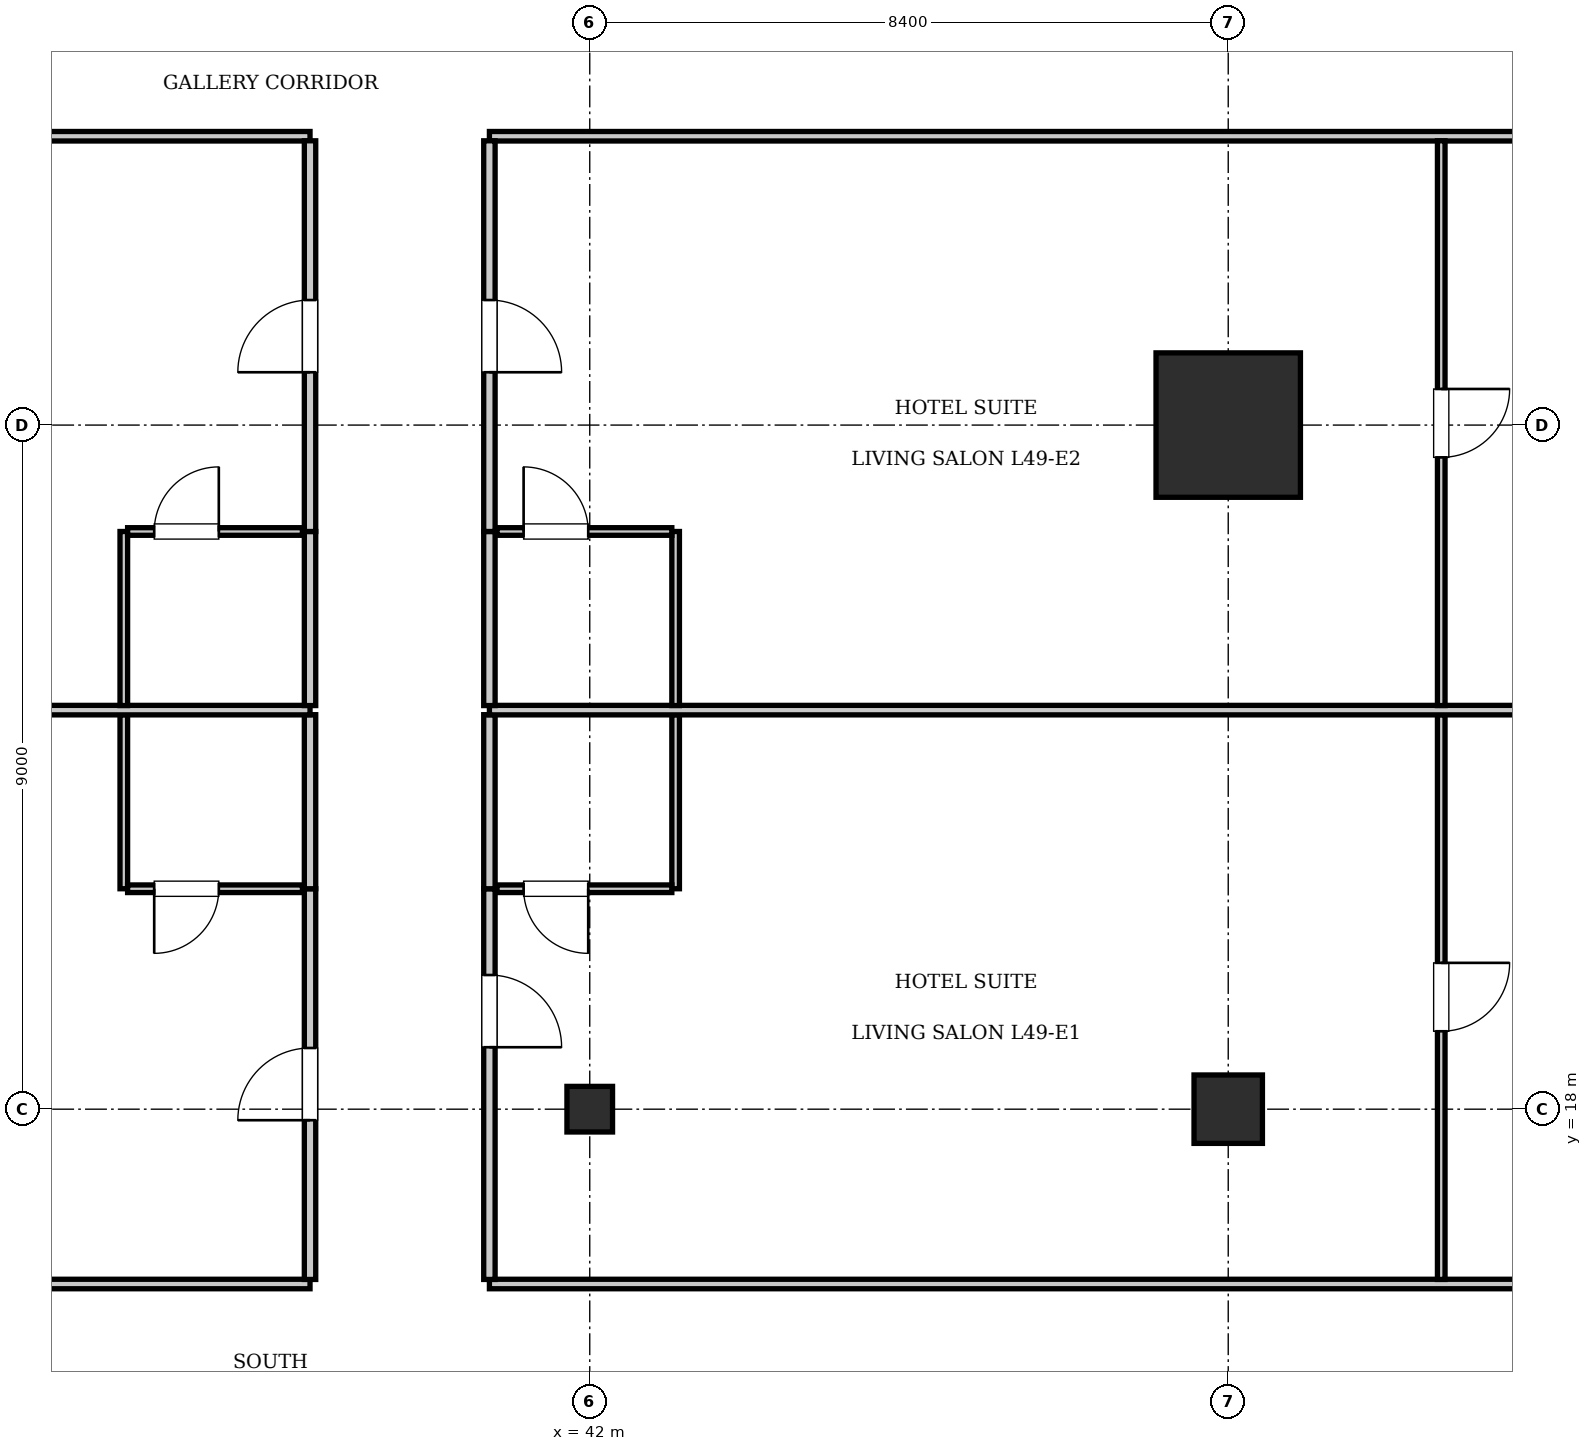
"""IFC4 building model, lengths in metres.
Left out: names, types, materials, properties, quantities, classifications, styles, units other than length and angle.
Written with IfcOpenShell. Run it as: python <this file> out.ifc"""

import sys

from ifc_helpers import new_model, si_unit, direction, frame, frame_2d, origin, origin_2d, place, context, subcontext, project, spatial, rectangle, i_section, extrude, element, fill, save


model = new_model("IFC4")
c1 = context("Model", 3, precision=1e-05, world=origin(), true_north=direction((0.0, 1.0)))
c2 = subcontext(c1, "Body", "Model", "MODEL_VIEW")
j1 = project(units=[si_unit("LENGTHUNIT", "METRE"), si_unit("PLANEANGLEUNIT", "RADIAN")], contexts=[c1])
p1 = place(None, origin())
s1 = spatial("IfcSite", under=j1, at=p1, CompositionType="ELEMENT")
p2 = place(p1, origin())
s2 = spatial("IfcBuilding", under=s1, at=p2, CompositionType="ELEMENT")
p3 = place(p2, frame((0.0, 0.0, 200.55)))
s3 = spatial("IfcBuildingStorey", under=s2, at=p3, CompositionType="ELEMENT", Elevation=200.55)
p4 = place(p3, frame((50.4, 27.0, 0.0), z_axis=(0.0, 0.0, 1.0), x_axis=(1.0, 0.0, 0.0)))
e1 = element("IfcColumn", 1, at=p4, inside=s3, PredefinedType="COLUMN", context=c2, shape_type="SweptSolid", body=[
    extrude(rectangle(XDim=1.9, YDim=1.9, at=origin_2d()), origin(), (0.0, 0.0, 1.0), 3.85),
])
p5 = place(p3, frame((50.4, 18.0, 0.0), z_axis=(0.0, 0.0, 1.0), x_axis=(1.0, 0.0, 0.0)))
e2 = element("IfcColumn", 2, at=p5, inside=s3, PredefinedType="COLUMN", context=c2, shape_type="SweptSolid", body=[
    extrude(rectangle(XDim=0.9, YDim=0.9, at=origin_2d()), origin(), (0.0, 0.0, 1.0), 3.85),
])
p6 = place(p3, frame((42.0, 18.0, 0.0), z_axis=(0.0, 0.0, 1.0), x_axis=(1.0, 0.0, 0.0)))
e3 = element("IfcColumn", 3, at=p6, inside=s3, PredefinedType="COLUMN", context=c2, shape_type="SweptSolid", body=[
    extrude(i_section(OverallWidth=0.6, OverallDepth=0.6, WebThickness=0.025, FlangeThickness=0.038, at=origin_2d()), origin(), (0.0, 0.0, 1.0), 3.85),
])
p7 = place(p3, frame((13.2, 15.7, 0.0), z_axis=(0.0, 0.0, 1.0), x_axis=(1.0, 0.0, 0.0)))
e4 = element("IfcWall", 4, at=p7, inside=s3, PredefinedType="PARTITIONING", context=c2, shape_type="SweptSolid", body=[
    extrude(rectangle(XDim=25.12, YDim=0.125, at=frame_2d((12.56, 0.0))), origin(), (0.0, 0.0, 1.0), 3.61),
])
p8 = place(p3, frame((40.68, 15.7, 0.0), z_axis=(0.0, 0.0, 1.0), x_axis=(1.0, 0.0, 0.0)))
e5 = element("IfcWall", 5, at=p8, inside=s3, PredefinedType="PARTITIONING", context=c2, shape_type="SweptSolid", body=[
    extrude(rectangle(XDim=21.72, YDim=0.125, at=frame_2d((10.86, 0.0))), origin(), (0.0, 0.0, 1.0), 3.61),
])
p9 = place(p3, frame((13.2, 30.8, 0.0), z_axis=(0.0, 0.0, 1.0), x_axis=(1.0, 0.0, 0.0)))
e6 = element("IfcWall", 6, at=p9, inside=s3, PredefinedType="PARTITIONING", context=c2, shape_type="SweptSolid", body=[
    extrude(rectangle(XDim=25.12, YDim=0.125, at=frame_2d((12.56, 0.0))), origin(), (0.0, 0.0, 1.0), 3.61),
])
p10 = place(p3, frame((40.68, 30.8, 0.0), z_axis=(0.0, 0.0, 1.0), x_axis=(1.0, 0.0, 0.0)))
e7 = element("IfcWall", 7, at=p10, inside=s3, PredefinedType="PARTITIONING", context=c2, shape_type="SweptSolid", body=[
    extrude(rectangle(XDim=21.72, YDim=0.125, at=frame_2d((10.86, 0.0))), origin(), (0.0, 0.0, 1.0), 3.61),
])
p11 = place(p3, frame((38.32, 15.76, 0.0), z_axis=(0.0, 0.0, 1.0), x_axis=(0.0, 1.0, 0.0)))
e8 = element("IfcWall", 8, at=p11, inside=s3, PredefinedType="PARTITIONING", context=c2, shape_type="SweptSolid", body=[
    extrude(rectangle(XDim=5.14, YDim=0.15, at=frame_2d((2.57, 0.0))), origin(), (0.0, 0.0, 1.0), 3.61),
])
p12 = place(p11, frame((2.095, 0.0, 0.0)))
e9 = element("IfcOpeningElement", 9, at=p12, cuts=e8, PredefinedType="OPENING", context=c2, shape_type="SweptSolid", body=[
    extrude(rectangle(XDim=0.95, YDim=2.15, at=frame_2d((0.475, 1.075))), frame((0.0, 0.085, 0.0), z_axis=(0.0, -1.0, 0.0), x_axis=(1.0, 0.0, 0.0)), (0.0, 0.0, 1.0), 0.17),
])
p13 = place(p3, frame((38.32, 20.9, 0.0), z_axis=(0.0, 0.0, 1.0), x_axis=(0.0, 1.0, 0.0)))
e10 = element("IfcWall", 10, at=p13, inside=s3, PredefinedType="PARTITIONING", context=c2, shape_type="SweptSolid", body=[
    extrude(rectangle(XDim=2.29, YDim=0.15, at=frame_2d((1.145, 0.0))), origin(), (0.0, 0.0, 1.0), 3.61),
])
p14 = place(p3, frame((35.87, 20.9, 0.0), z_axis=(0.0, 0.0, 1.0), x_axis=(0.0, 1.0, 0.0)))
e11 = element("IfcWall", 11, at=p14, inside=s3, PredefinedType="PARTITIONING", context=c2, shape_type="SweptSolid", body=[
    extrude(rectangle(XDim=2.29, YDim=0.1, at=frame_2d((1.145, 0.0))), origin(), (0.0, 0.0, 1.0), 3.61),
])
p15 = place(p3, frame((35.92, 20.9, 0.0), z_axis=(0.0, 0.0, 1.0), x_axis=(1.0, 0.0, 0.0)))
e12 = element("IfcWall", 12, at=p15, inside=s3, PredefinedType="PARTITIONING", context=c2, shape_type="SweptSolid", body=[
    extrude(rectangle(XDim=2.3, YDim=0.1, at=frame_2d((1.15, 0.0))), origin(), (0.0, 0.0, 1.0), 3.61),
])
p16 = place(p15, frame((0.35, 0.0, 0.0)))
e13 = element("IfcOpeningElement", 13, at=p16, cuts=e12, PredefinedType="OPENING", context=c2, shape_type="SweptSolid", body=[
    extrude(rectangle(XDim=0.85, YDim=2.1, at=frame_2d((0.425, 1.05))), frame((0.0, 0.06, 0.0), z_axis=(0.0, -1.0, 0.0), x_axis=(1.0, 0.0, 0.0)), (0.0, 0.0, 1.0), 0.12),
])
p17 = place(p3, frame((40.68, 15.76, 0.0), z_axis=(0.0, 0.0, 1.0), x_axis=(0.0, 1.0, 0.0)))
e14 = element("IfcWall", 14, at=p17, inside=s3, PredefinedType="PARTITIONING", context=c2, shape_type="SweptSolid", body=[
    extrude(rectangle(XDim=5.14, YDim=0.15, at=frame_2d((2.57, 0.0))), origin(), (0.0, 0.0, 1.0), 3.61),
])
p18 = place(p17, frame((3.055, 0.0, 0.0)))
e15 = element("IfcOpeningElement", 15, at=p18, cuts=e14, PredefinedType="OPENING", context=c2, shape_type="SweptSolid", body=[
    extrude(rectangle(XDim=0.95, YDim=2.15, at=frame_2d((0.475, 1.075))), frame((0.0, 0.085, 0.0), z_axis=(0.0, -1.0, 0.0), x_axis=(1.0, 0.0, 0.0)), (0.0, 0.0, 1.0), 0.17),
])
p19 = place(p3, frame((40.68, 20.9, 0.0), z_axis=(0.0, 0.0, 1.0), x_axis=(0.0, 1.0, 0.0)))
e16 = element("IfcWall", 16, at=p19, inside=s3, PredefinedType="PARTITIONING", context=c2, shape_type="SweptSolid", body=[
    extrude(rectangle(XDim=2.29, YDim=0.15, at=frame_2d((1.145, 0.0))), origin(), (0.0, 0.0, 1.0), 3.61),
])
p20 = place(p3, frame((43.13, 20.9, 0.0), z_axis=(0.0, 0.0, 1.0), x_axis=(0.0, 1.0, 0.0)))
e17 = element("IfcWall", 17, at=p20, inside=s3, PredefinedType="PARTITIONING", context=c2, shape_type="SweptSolid", body=[
    extrude(rectangle(XDim=2.29, YDim=0.1, at=frame_2d((1.145, 0.0))), origin(), (0.0, 0.0, 1.0), 3.61),
])
p21 = place(p3, frame((40.78, 20.9, 0.0), z_axis=(0.0, 0.0, 1.0), x_axis=(1.0, 0.0, 0.0)))
e18 = element("IfcWall", 18, at=p21, inside=s3, PredefinedType="PARTITIONING", context=c2, shape_type="SweptSolid", body=[
    extrude(rectangle(XDim=2.3, YDim=0.1, at=frame_2d((1.15, 0.0))), origin(), (0.0, 0.0, 1.0), 3.61),
])
p22 = place(p21, frame((0.35, 0.0, 0.0)))
e19 = element("IfcOpeningElement", 19, at=p22, cuts=e18, PredefinedType="OPENING", context=c2, shape_type="SweptSolid", body=[
    extrude(rectangle(XDim=0.85, YDim=2.1, at=frame_2d((0.425, 1.05))), frame((0.0, 0.06, 0.0), z_axis=(0.0, -1.0, 0.0), x_axis=(1.0, 0.0, 0.0)), (0.0, 0.0, 1.0), 0.12),
])
p23 = place(p3, frame((53.202, 15.76, 0.0), z_axis=(0.0, 0.0, 1.0), x_axis=(0.0, 1.0, 0.0)))
e20 = element("IfcWall", 20, at=p23, inside=s3, PredefinedType="PARTITIONING", context=c2, shape_type="SweptSolid", body=[
    extrude(rectangle(XDim=7.43, YDim=0.1, at=frame_2d((3.715, 0.0))), origin(), (0.0, 0.0, 1.0), 3.61),
])
p24 = place(p23, frame((3.265, 0.0, 0.0)))
e21 = element("IfcOpeningElement", 21, at=p24, cuts=e20, PredefinedType="OPENING", context=c2, shape_type="SweptSolid", body=[
    extrude(rectangle(XDim=0.9, YDim=2.1, at=frame_2d((0.45, 1.05))), frame((0.0, 0.06, 0.0), z_axis=(0.0, -1.0, 0.0), x_axis=(1.0, 0.0, 0.0)), (0.0, 0.0, 1.0), 0.12),
])
p25 = place(p3, frame((13.2, 23.25, 0.0), z_axis=(0.0, 0.0, 1.0), x_axis=(1.0, 0.0, 0.0)))
e22 = element("IfcWall", 22, at=p25, inside=s3, PredefinedType="PARTITIONING", context=c2, shape_type="SweptSolid", body=[
    extrude(rectangle(XDim=25.12, YDim=0.125, at=frame_2d((12.56, 0.0))), origin(), (0.0, 0.0, 1.0), 3.61),
])
p26 = place(p3, frame((40.68, 23.25, 0.0), z_axis=(0.0, 0.0, 1.0), x_axis=(1.0, 0.0, 0.0)))
e23 = element("IfcWall", 23, at=p26, inside=s3, PredefinedType="PARTITIONING", context=c2, shape_type="SweptSolid", body=[
    extrude(rectangle(XDim=21.72, YDim=0.125, at=frame_2d((10.86, 0.0))), origin(), (0.0, 0.0, 1.0), 3.61),
])
p27 = place(p3, frame((38.32, 23.31, 0.0), z_axis=(0.0, 0.0, 1.0), x_axis=(0.0, 1.0, 0.0)))
e24 = element("IfcWall", 24, at=p27, inside=s3, PredefinedType="PARTITIONING", context=c2, shape_type="SweptSolid", body=[
    extrude(rectangle(XDim=2.29, YDim=0.15, at=frame_2d((1.145, 0.0))), origin(), (0.0, 0.0, 1.0), 3.61),
])
p28 = place(p3, frame((38.32, 25.6, 0.0), z_axis=(0.0, 0.0, 1.0), x_axis=(0.0, 1.0, 0.0)))
e25 = element("IfcWall", 25, at=p28, inside=s3, PredefinedType="PARTITIONING", context=c2, shape_type="SweptSolid", body=[
    extrude(rectangle(XDim=5.14, YDim=0.15, at=frame_2d((2.57, 0.0))), origin(), (0.0, 0.0, 1.0), 3.61),
])
p29 = place(p28, frame((2.095, 0.0, 0.0)))
e26 = element("IfcOpeningElement", 26, at=p29, cuts=e25, PredefinedType="OPENING", context=c2, shape_type="SweptSolid", body=[
    extrude(rectangle(XDim=0.95, YDim=2.15, at=frame_2d((0.475, 1.075))), frame((0.0, 0.085, 0.0), z_axis=(0.0, -1.0, 0.0), x_axis=(1.0, 0.0, 0.0)), (0.0, 0.0, 1.0), 0.17),
])
p30 = place(p3, frame((35.87, 23.31, 0.0), z_axis=(0.0, 0.0, 1.0), x_axis=(0.0, 1.0, 0.0)))
e27 = element("IfcWall", 27, at=p30, inside=s3, PredefinedType="PARTITIONING", context=c2, shape_type="SweptSolid", body=[
    extrude(rectangle(XDim=2.29, YDim=0.1, at=frame_2d((1.145, 0.0))), origin(), (0.0, 0.0, 1.0), 3.61),
])
p31 = place(p3, frame((35.92, 25.6, 0.0), z_axis=(0.0, 0.0, 1.0), x_axis=(1.0, 0.0, 0.0)))
e28 = element("IfcWall", 28, at=p31, inside=s3, PredefinedType="PARTITIONING", context=c2, shape_type="SweptSolid", body=[
    extrude(rectangle(XDim=2.3, YDim=0.1, at=frame_2d((1.15, 0.0))), origin(), (0.0, 0.0, 1.0), 3.61),
])
p32 = place(p31, frame((0.35, 0.0, 0.0)))
e29 = element("IfcOpeningElement", 29, at=p32, cuts=e28, PredefinedType="OPENING", context=c2, shape_type="SweptSolid", body=[
    extrude(rectangle(XDim=0.85, YDim=2.1, at=frame_2d((0.425, 1.05))), frame((0.0, 0.06, 0.0), z_axis=(0.0, -1.0, 0.0), x_axis=(1.0, 0.0, 0.0)), (0.0, 0.0, 1.0), 0.12),
])
p33 = place(p3, frame((40.68, 23.31, 0.0), z_axis=(0.0, 0.0, 1.0), x_axis=(0.0, 1.0, 0.0)))
e30 = element("IfcWall", 30, at=p33, inside=s3, PredefinedType="PARTITIONING", context=c2, shape_type="SweptSolid", body=[
    extrude(rectangle(XDim=2.29, YDim=0.15, at=frame_2d((1.145, 0.0))), origin(), (0.0, 0.0, 1.0), 3.61),
])
p34 = place(p3, frame((40.68, 25.6, 0.0), z_axis=(0.0, 0.0, 1.0), x_axis=(0.0, 1.0, 0.0)))
e31 = element("IfcWall", 31, at=p34, inside=s3, PredefinedType="PARTITIONING", context=c2, shape_type="SweptSolid", body=[
    extrude(rectangle(XDim=5.14, YDim=0.15, at=frame_2d((2.57, 0.0))), origin(), (0.0, 0.0, 1.0), 3.61),
])
p35 = place(p34, frame((2.095, 0.0, 0.0)))
e32 = element("IfcOpeningElement", 32, at=p35, cuts=e31, PredefinedType="OPENING", context=c2, shape_type="SweptSolid", body=[
    extrude(rectangle(XDim=0.95, YDim=2.15, at=frame_2d((0.475, 1.075))), frame((0.0, 0.085, 0.0), z_axis=(0.0, -1.0, 0.0), x_axis=(1.0, 0.0, 0.0)), (0.0, 0.0, 1.0), 0.17),
])
p36 = place(p3, frame((43.13, 23.31, 0.0), z_axis=(0.0, 0.0, 1.0), x_axis=(0.0, 1.0, 0.0)))
e33 = element("IfcWall", 33, at=p36, inside=s3, PredefinedType="PARTITIONING", context=c2, shape_type="SweptSolid", body=[
    extrude(rectangle(XDim=2.29, YDim=0.1, at=frame_2d((1.145, 0.0))), origin(), (0.0, 0.0, 1.0), 3.61),
])
p37 = place(p3, frame((40.78, 25.6, 0.0), z_axis=(0.0, 0.0, 1.0), x_axis=(1.0, 0.0, 0.0)))
e34 = element("IfcWall", 34, at=p37, inside=s3, PredefinedType="PARTITIONING", context=c2, shape_type="SweptSolid", body=[
    extrude(rectangle(XDim=2.3, YDim=0.1, at=frame_2d((1.15, 0.0))), origin(), (0.0, 0.0, 1.0), 3.61),
])
p38 = place(p37, frame((0.35, 0.0, 0.0)))
e35 = element("IfcOpeningElement", 35, at=p38, cuts=e34, PredefinedType="OPENING", context=c2, shape_type="SweptSolid", body=[
    extrude(rectangle(XDim=0.85, YDim=2.1, at=frame_2d((0.425, 1.05))), frame((0.0, 0.06, 0.0), z_axis=(0.0, -1.0, 0.0), x_axis=(1.0, 0.0, 0.0)), (0.0, 0.0, 1.0), 0.12),
])
p39 = place(p3, frame((53.202, 23.31, 0.0), z_axis=(0.0, 0.0, 1.0), x_axis=(0.0, 1.0, 0.0)))
e36 = element("IfcWall", 36, at=p39, inside=s3, PredefinedType="PARTITIONING", context=c2, shape_type="SweptSolid", body=[
    extrude(rectangle(XDim=7.43, YDim=0.1, at=frame_2d((3.715, 0.0))), origin(), (0.0, 0.0, 1.0), 3.61),
])
p40 = place(p39, frame((3.265, 0.0, 0.0)))
e37 = element("IfcOpeningElement", 37, at=p40, cuts=e36, PredefinedType="OPENING", context=c2, shape_type="SweptSolid", body=[
    extrude(rectangle(XDim=0.9, YDim=2.1, at=frame_2d((0.45, 1.05))), frame((0.0, 0.06, 0.0), z_axis=(0.0, -1.0, 0.0), x_axis=(1.0, 0.0, 0.0)), (0.0, 0.0, 1.0), 0.12),
])
p41 = place(p16, frame((0.85, 0.0, 0.0), z_axis=(0.0, 0.0, 1.0), x_axis=(-1.0, 0.0, 0.0)))
e38 = element("IfcDoor", 38, at=p41, inside=s3, OperationType="SINGLE_SWING_RIGHT", PredefinedType="DOOR", context=c2, shape_type="SweptSolid", body=[
    extrude(rectangle(XDim=0.85, YDim=2.1, at=frame_2d((0.425, 1.05))), frame((0.0, 0.025, 0.0), z_axis=(0.0, -1.0, 0.0), x_axis=(1.0, 0.0, 0.0)), (0.0, 0.0, 1.0), 0.05),
])
fill(e13, e38)
p42 = place(p12, origin())
e39 = element("IfcDoor", 39, at=p42, inside=s3, OperationType="SINGLE_SWING_LEFT", PredefinedType="DOOR", context=c2, shape_type="SweptSolid", body=[
    extrude(rectangle(XDim=0.95, YDim=2.15, at=frame_2d((0.475, 1.075))), frame((0.0, 0.025, 0.0), z_axis=(0.0, -1.0, 0.0), x_axis=(1.0, 0.0, 0.0)), (0.0, 0.0, 1.0), 0.05),
])
fill(e9, e39)
p43 = place(p22, frame((0.85, 0.0, 0.0), z_axis=(0.0, 0.0, 1.0), x_axis=(-1.0, 0.0, 0.0)))
e40 = element("IfcDoor", 40, at=p43, inside=s3, OperationType="SINGLE_SWING_LEFT", PredefinedType="DOOR", context=c2, shape_type="SweptSolid", body=[
    extrude(rectangle(XDim=0.85, YDim=2.1, at=frame_2d((0.425, 1.05))), frame((0.0, 0.025, 0.0), z_axis=(0.0, -1.0, 0.0), x_axis=(1.0, 0.0, 0.0)), (0.0, 0.0, 1.0), 0.05),
])
fill(e19, e40)
p44 = place(p18, frame((0.95, 0.0, 0.0), z_axis=(0.0, 0.0, 1.0), x_axis=(-1.0, 0.0, 0.0)))
e41 = element("IfcDoor", 41, at=p44, inside=s3, OperationType="SINGLE_SWING_RIGHT", PredefinedType="DOOR", context=c2, shape_type="SweptSolid", body=[
    extrude(rectangle(XDim=0.95, YDim=2.15, at=frame_2d((0.475, 1.075))), frame((0.0, 0.025, 0.0), z_axis=(0.0, -1.0, 0.0), x_axis=(1.0, 0.0, 0.0)), (0.0, 0.0, 1.0), 0.05),
])
fill(e15, e41)
p45 = place(p24, frame((0.9, 0.0, 0.0), z_axis=(0.0, 0.0, 1.0), x_axis=(-1.0, 0.0, 0.0)))
e42 = element("IfcDoor", 42, at=p45, inside=s3, OperationType="SINGLE_SWING_LEFT", PredefinedType="DOOR", context=c2, shape_type="SweptSolid", body=[
    extrude(rectangle(XDim=0.9, YDim=2.1, at=frame_2d((0.45, 1.05))), frame((0.0, 0.025, 0.0), z_axis=(0.0, -1.0, 0.0), x_axis=(1.0, 0.0, 0.0)), (0.0, 0.0, 1.0), 0.05),
])
fill(e21, e42)
p46 = place(p32, origin())
e43 = element("IfcDoor", 43, at=p46, inside=s3, OperationType="SINGLE_SWING_RIGHT", PredefinedType="DOOR", context=c2, shape_type="SweptSolid", body=[
    extrude(rectangle(XDim=0.85, YDim=2.1, at=frame_2d((0.425, 1.05))), frame((0.0, 0.025, 0.0), z_axis=(0.0, -1.0, 0.0), x_axis=(1.0, 0.0, 0.0)), (0.0, 0.0, 1.0), 0.05),
])
fill(e29, e43)
p47 = place(p29, origin())
e44 = element("IfcDoor", 44, at=p47, inside=s3, OperationType="SINGLE_SWING_LEFT", PredefinedType="DOOR", context=c2, shape_type="SweptSolid", body=[
    extrude(rectangle(XDim=0.95, YDim=2.15, at=frame_2d((0.475, 1.075))), frame((0.0, 0.025, 0.0), z_axis=(0.0, -1.0, 0.0), x_axis=(1.0, 0.0, 0.0)), (0.0, 0.0, 1.0), 0.05),
])
fill(e26, e44)
p48 = place(p38, origin())
e45 = element("IfcDoor", 45, at=p48, inside=s3, OperationType="SINGLE_SWING_LEFT", PredefinedType="DOOR", context=c2, shape_type="SweptSolid", body=[
    extrude(rectangle(XDim=0.85, YDim=2.1, at=frame_2d((0.425, 1.05))), frame((0.0, 0.025, 0.0), z_axis=(0.0, -1.0, 0.0), x_axis=(1.0, 0.0, 0.0)), (0.0, 0.0, 1.0), 0.05),
])
fill(e35, e45)
p49 = place(p35, frame((0.95, 0.0, 0.0), z_axis=(0.0, 0.0, 1.0), x_axis=(-1.0, 0.0, 0.0)))
e46 = element("IfcDoor", 46, at=p49, inside=s3, OperationType="SINGLE_SWING_RIGHT", PredefinedType="DOOR", context=c2, shape_type="SweptSolid", body=[
    extrude(rectangle(XDim=0.95, YDim=2.15, at=frame_2d((0.475, 1.075))), frame((0.0, 0.025, 0.0), z_axis=(0.0, -1.0, 0.0), x_axis=(1.0, 0.0, 0.0)), (0.0, 0.0, 1.0), 0.05),
])
fill(e32, e46)
p50 = place(p40, frame((0.9, 0.0, 0.0), z_axis=(0.0, 0.0, 1.0), x_axis=(-1.0, 0.0, 0.0)))
e47 = element("IfcDoor", 47, at=p50, inside=s3, OperationType="SINGLE_SWING_LEFT", PredefinedType="DOOR", context=c2, shape_type="SweptSolid", body=[
    extrude(rectangle(XDim=0.9, YDim=2.1, at=frame_2d((0.45, 1.05))), frame((0.0, 0.025, 0.0), z_axis=(0.0, -1.0, 0.0), x_axis=(1.0, 0.0, 0.0)), (0.0, 0.0, 1.0), 0.05),
])
fill(e37, e47)
save(model, sys.argv[1])
